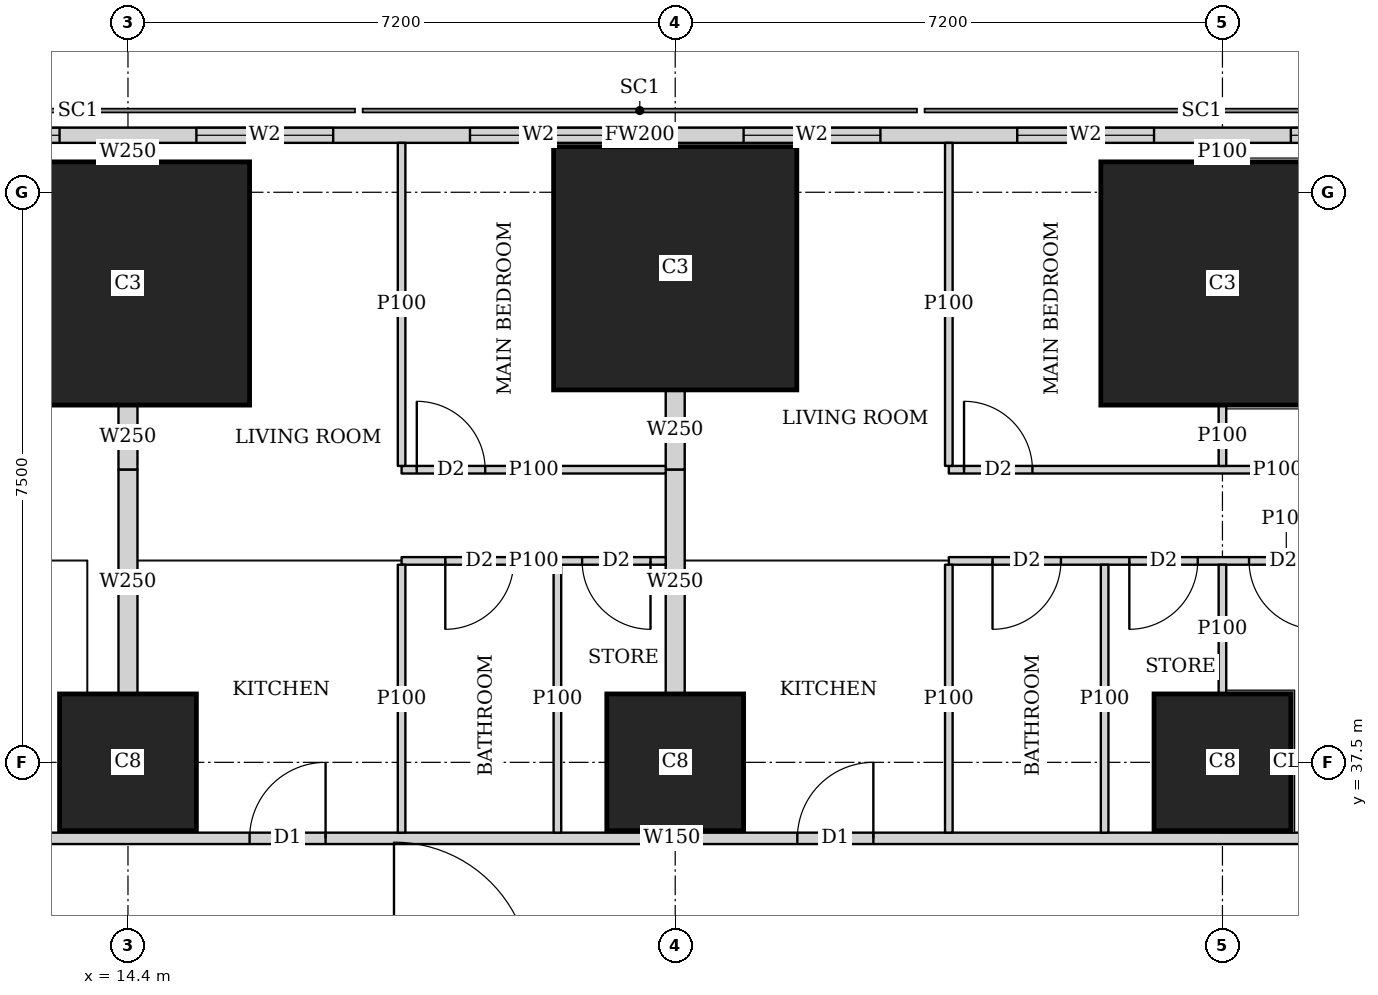
"""IFC4 building model, lengths in metres.
Left out: names, types, materials, properties, quantities, classifications, styles, units other than length and angle.
Written with IfcOpenShell. Run it as: python <this file> out.ifc"""

import sys

from ifc_helpers import new_model, si_unit, direction, frame, frame_2d, origin, origin_2d, place, context, subcontext, project, spatial, rectangle, extrude, element, fill, save


model = new_model("IFC4")
c1 = context("Model", 3, precision=1e-05, world=origin(), true_north=direction((0.0, 1.0)))
c2 = subcontext(c1, "Body", "Model", "MODEL_VIEW")
j1 = project(units=[si_unit("LENGTHUNIT", "METRE"), si_unit("PLANEANGLEUNIT", "RADIAN")], contexts=[c1])
p1 = place(None, origin())
s1 = spatial("IfcSite", under=j1, at=p1, CompositionType="ELEMENT")
p2 = place(p1, origin())
s2 = spatial("IfcBuilding", under=s1, at=p2, CompositionType="ELEMENT")
p3 = place(p2, frame((0.0, 0.0, 23.75)))
s3 = spatial("IfcBuildingStorey", under=s2, at=p3, CompositionType="ELEMENT", Elevation=23.75)
for number, where, z_axis, x_axis in (
    (1, (14.4, 37.5, 0.0), (0.0, 0.0, 1.0), (1.0, 0.0, 0.0)),
    (2, (21.6, 37.5, 0.0), (0.0, 0.0, 1.0), (1.0, 0.0, 0.0)),
    (3, (28.8, 37.5, 0.0), (0.0, 0.0, 1.0), (1.0, 0.0, 0.0)),
):
    element("IfcColumn", number, at=place(p3, frame(where, z_axis=z_axis, x_axis=x_axis)), inside=s3, PredefinedType="COLUMN", context=c2, shape_type="SweptSolid", body=[
        extrude(rectangle(XDim=1.8, YDim=1.8, at=origin_2d()), origin(), (0.0, 0.0, 1.0), 3.75),
    ])
for number, where, z_axis, x_axis in (
    (4, (14.4, 43.8, 0.0), (0.0, 0.0, 1.0), (1.0, 0.0, 0.0)),
    (5, (21.6, 44.0, 0.0), (0.0, 0.0, 1.0), (1.0, 0.0, 0.0)),
    (6, (28.8, 43.8, 0.0), (0.0, 0.0, 1.0), (1.0, 0.0, 0.0)),
):
    element("IfcColumn", number, at=place(p3, frame(where, z_axis=z_axis, x_axis=x_axis)), inside=s3, PredefinedType="COLUMN", context=c2, shape_type="SweptSolid", body=[
        extrude(rectangle(XDim=3.2, YDim=3.2, at=origin_2d()), origin(), (0.0, 0.0, 1.0), 3.75),
    ])
p4 = place(p3, frame((40.106, 45.75, 0.0), z_axis=(0.0, 0.0, 1.0), x_axis=(-1.0, 0.0, 0.0)))
e7 = element("IfcWall", 7, at=p4, inside=s3, PredefinedType="SOLIDWALL", context=c2, shape_type="SweptSolid", body=[
    extrude(rectangle(XDim=37.943, YDim=0.2, at=frame_2d((18.971, 0.0))), origin(), (0.0, 0.0, 1.0), 3.5),
])
p5 = place(p4, frame((8.606, 0.0, 0.9)))
e8 = element("IfcOpeningElement", 8, at=p5, cuts=e7, PredefinedType="OPENING", context=c2, shape_type="SweptSolid", body=[
    extrude(rectangle(XDim=1.8, YDim=1.5, at=frame_2d((0.9, 0.75))), frame((0.0, 0.11, 0.0), z_axis=(0.0, -1.0, 0.0), x_axis=(1.0, 0.0, 0.0)), (0.0, 0.0, 1.0), 0.22),
])
p6 = place(p4, frame((12.206, 0.0, 0.9)))
e9 = element("IfcOpeningElement", 9, at=p6, cuts=e7, PredefinedType="OPENING", context=c2, shape_type="SweptSolid", body=[
    extrude(rectangle(XDim=1.8, YDim=1.5, at=frame_2d((0.9, 0.75))), frame((0.0, 0.11, 0.0), z_axis=(0.0, -1.0, 0.0), x_axis=(1.0, 0.0, 0.0)), (0.0, 0.0, 1.0), 0.22),
])
p7 = place(p4, frame((15.806, 0.0, 0.9)))
e10 = element("IfcOpeningElement", 10, at=p7, cuts=e7, PredefinedType="OPENING", context=c2, shape_type="SweptSolid", body=[
    extrude(rectangle(XDim=1.8, YDim=1.5, at=frame_2d((0.9, 0.75))), frame((0.0, 0.11, 0.0), z_axis=(0.0, -1.0, 0.0), x_axis=(1.0, 0.0, 0.0)), (0.0, 0.0, 1.0), 0.22),
])
p8 = place(p4, frame((19.406, 0.0, 0.9)))
e11 = element("IfcOpeningElement", 11, at=p8, cuts=e7, PredefinedType="OPENING", context=c2, shape_type="SweptSolid", body=[
    extrude(rectangle(XDim=1.8, YDim=1.5, at=frame_2d((0.9, 0.75))), frame((0.0, 0.11, 0.0), z_axis=(0.0, -1.0, 0.0), x_axis=(1.0, 0.0, 0.0)), (0.0, 0.0, 1.0), 0.22),
])
p9 = place(p4, frame((23.006, 0.0, 0.9)))
e12 = element("IfcOpeningElement", 12, at=p9, cuts=e7, PredefinedType="OPENING", context=c2, shape_type="SweptSolid", body=[
    extrude(rectangle(XDim=1.8, YDim=1.5, at=frame_2d((0.9, 0.75))), frame((0.0, 0.11, 0.0), z_axis=(0.0, -1.0, 0.0), x_axis=(1.0, 0.0, 0.0)), (0.0, 0.0, 1.0), 0.22),
])
p10 = place(p4, frame((26.606, 0.0, 0.9)))
e13 = element("IfcOpeningElement", 13, at=p10, cuts=e7, PredefinedType="OPENING", context=c2, shape_type="SweptSolid", body=[
    extrude(rectangle(XDim=1.8, YDim=1.5, at=frame_2d((0.9, 0.75))), frame((0.0, 0.11, 0.0), z_axis=(0.0, -1.0, 0.0), x_axis=(1.0, 0.0, 0.0)), (0.0, 0.0, 1.0), 0.22),
])
p11 = place(p3, frame((8.35, 36.5, 0.0), z_axis=(0.0, 0.0, 1.0), x_axis=(1.0, 0.0, 0.0)))
e14 = element("IfcWall", 14, at=p11, inside=s3, PredefinedType="SOLIDWALL", context=c2, shape_type="SweptSolid", body=[
    extrude(rectangle(XDim=26.415, YDim=0.15, at=frame_2d((13.208, 0.0))), origin(), (0.0, 0.0, 1.0), 3.5),
])
p12 = place(p11, frame((3.383, 0.0, 0.0)))
e15 = element("IfcOpeningElement", 15, at=p12, cuts=e14, PredefinedType="OPENING", context=c2, shape_type="SweptSolid", body=[
    extrude(rectangle(XDim=1.0, YDim=2.1, at=frame_2d((0.5, 1.05))), frame((0.0, 0.085, 0.0), z_axis=(0.0, -1.0, 0.0), x_axis=(1.0, 0.0, 0.0)), (0.0, 0.0, 1.0), 0.17),
])
p13 = place(p11, frame((7.65, 0.0, 0.0)))
e16 = element("IfcOpeningElement", 16, at=p13, cuts=e14, PredefinedType="OPENING", context=c2, shape_type="SweptSolid", body=[
    extrude(rectangle(XDim=1.0, YDim=2.1, at=frame_2d((0.5, 1.05))), frame((0.0, 0.085, 0.0), z_axis=(0.0, -1.0, 0.0), x_axis=(1.0, 0.0, 0.0)), (0.0, 0.0, 1.0), 0.17),
])
p14 = place(p11, frame((14.857, 0.0, 0.0)))
e17 = element("IfcOpeningElement", 17, at=p14, cuts=e14, PredefinedType="OPENING", context=c2, shape_type="SweptSolid", body=[
    extrude(rectangle(XDim=1.0, YDim=2.1, at=frame_2d((0.5, 1.05))), frame((0.0, 0.085, 0.0), z_axis=(0.0, -1.0, 0.0), x_axis=(1.0, 0.0, 0.0)), (0.0, 0.0, 1.0), 0.17),
])
p15 = place(p3, frame((18.0, 41.35, 0.0), z_axis=(0.0, 0.0, 1.0), x_axis=(1.0, 0.0, 0.0)))
e18 = element("IfcWall", 18, at=p15, inside=s3, PredefinedType="PARTITIONING", context=c2, shape_type="SweptSolid", body=[
    extrude(rectangle(XDim=3.475, YDim=0.1, at=frame_2d((1.738, 0.0))), origin(), (0.0, 0.0, 1.0), 3.5),
])
p16 = place(p15, frame((0.2, 0.0, 0.0)))
e19 = element("IfcOpeningElement", 19, at=p16, cuts=e18, PredefinedType="OPENING", context=c2, shape_type="SweptSolid", body=[
    extrude(rectangle(XDim=0.9, YDim=2.1, at=frame_2d((0.45, 1.05))), frame((0.0, 0.06, 0.0), z_axis=(0.0, -1.0, 0.0), x_axis=(1.0, 0.0, 0.0)), (0.0, 0.0, 1.0), 0.12),
])
p17 = place(p3, frame((18.0, 40.15, 0.0), z_axis=(0.0, 0.0, 1.0), x_axis=(1.0, 0.0, 0.0)))
e20 = element("IfcWall", 20, at=p17, inside=s3, PredefinedType="PARTITIONING", context=c2, shape_type="SweptSolid", body=[
    extrude(rectangle(XDim=3.475, YDim=0.1, at=frame_2d((1.738, 0.0))), origin(), (0.0, 0.0, 1.0), 3.5),
])
p18 = place(p17, frame((0.575, 0.0, 0.0)))
e21 = element("IfcOpeningElement", 21, at=p18, cuts=e20, PredefinedType="OPENING", context=c2, shape_type="SweptSolid", body=[
    extrude(rectangle(XDim=0.9, YDim=2.1, at=frame_2d((0.45, 1.05))), frame((0.0, 0.06, 0.0), z_axis=(0.0, -1.0, 0.0), x_axis=(1.0, 0.0, 0.0)), (0.0, 0.0, 1.0), 0.12),
])
p19 = place(p17, frame((2.375, 0.0, 0.0)))
e22 = element("IfcOpeningElement", 22, at=p19, cuts=e20, PredefinedType="OPENING", context=c2, shape_type="SweptSolid", body=[
    extrude(rectangle(XDim=0.9, YDim=2.1, at=frame_2d((0.45, 1.05))), frame((0.0, 0.06, 0.0), z_axis=(0.0, -1.0, 0.0), x_axis=(1.0, 0.0, 0.0)), (0.0, 0.0, 1.0), 0.12),
])
p20 = place(p3, frame((18.0, 41.4, 0.0), z_axis=(0.0, 0.0, 1.0), x_axis=(0.0, 1.0, 0.0)))
e23 = element("IfcWall", 23, at=p20, inside=s3, PredefinedType="PARTITIONING", context=c2, shape_type="SweptSolid", body=[
    extrude(rectangle(XDim=4.25, YDim=0.1, at=frame_2d((2.125, 0.0))), origin(), (0.0, 0.0, 1.0), 2.05),
])
for number, where, z_axis, x_axis in (
    (24, (18.0, 36.575, 0.0), (0.0, 0.0, 1.0), (0.0, 1.0, 0.0)),
    (25, (20.05, 36.575, 0.0), (0.0, 0.0, 1.0), (0.0, 1.0, 0.0)),
):
    element("IfcWall", number, at=place(p3, frame(where, z_axis=z_axis, x_axis=x_axis)), inside=s3, PredefinedType="PARTITIONING", context=c2, shape_type="SweptSolid", body=[
        extrude(rectangle(XDim=3.525, YDim=0.1, at=frame_2d((1.763, 0.0))), origin(), (0.0, 0.0, 1.0), 3.5),
    ])
p21 = place(p3, frame((14.4, 41.35, 0.0), z_axis=(0.0, 0.0, 1.0), x_axis=(0.0, 1.0, 0.0)))
e26 = element("IfcWall", 26, at=p21, inside=s3, PredefinedType="SOLIDWALL", context=c2, shape_type="SweptSolid", body=[
    extrude(rectangle(XDim=0.849, YDim=0.25, at=frame_2d((0.424, 0.0))), origin(), (0.0, 0.0, 1.0), 2.05),
])
p22 = place(p3, frame((14.4, 45.401, 0.0), z_axis=(0.0, 0.0, 1.0), x_axis=(0.0, 1.0, 0.0)))
e27 = element("IfcWall", 27, at=p22, inside=s3, PredefinedType="SOLIDWALL", context=c2, shape_type="SweptSolid", body=[
    extrude(rectangle(XDim=0.249, YDim=0.25, at=frame_2d((0.125, 0.0))), origin(), (0.0, 0.0, 1.0), 2.05),
])
p23 = place(p3, frame((14.4, 38.401, 0.0), z_axis=(0.0, 0.0, 1.0), x_axis=(0.0, 1.0, 0.0)))
e28 = element("IfcWall", 28, at=p23, inside=s3, PredefinedType="SOLIDWALL", context=c2, shape_type="SweptSolid", body=[
    extrude(rectangle(XDim=2.949, YDim=0.25, at=frame_2d((1.475, 0.0))), origin(), (0.0, 0.0, 1.0), 3.5),
])
p24 = place(p3, frame((25.2, 41.35, 0.0), z_axis=(0.0, 0.0, 1.0), x_axis=(1.0, 0.0, 0.0)))
e29 = element("IfcWall", 29, at=p24, inside=s3, PredefinedType="PARTITIONING", context=c2, shape_type="SweptSolid", body=[
    extrude(rectangle(XDim=8.653, YDim=0.1, at=frame_2d((4.327, 0.0))), origin(), (0.0, 0.0, 1.0), 3.5),
])
p25 = place(p24, frame((0.2, 0.0, 0.0)))
e30 = element("IfcOpeningElement", 30, at=p25, cuts=e29, PredefinedType="OPENING", context=c2, shape_type="SweptSolid", body=[
    extrude(rectangle(XDim=0.9, YDim=2.1, at=frame_2d((0.45, 1.05))), frame((0.0, 0.06, 0.0), z_axis=(0.0, -1.0, 0.0), x_axis=(1.0, 0.0, 0.0)), (0.0, 0.0, 1.0), 0.12),
])
p26 = place(p24, frame((5.25, 0.0, 0.0)))
e31 = element("IfcOpeningElement", 31, at=p26, cuts=e29, PredefinedType="OPENING", context=c2, shape_type="SweptSolid", body=[
    extrude(rectangle(XDim=0.9, YDim=2.1, at=frame_2d((0.45, 1.05))), frame((0.0, 0.06, 0.0), z_axis=(0.0, -1.0, 0.0), x_axis=(1.0, 0.0, 0.0)), (0.0, 0.0, 1.0), 0.12),
])
p27 = place(p3, frame((25.2, 40.15, 0.0), z_axis=(0.0, 0.0, 1.0), x_axis=(1.0, 0.0, 0.0)))
e32 = element("IfcWall", 32, at=p27, inside=s3, PredefinedType="PARTITIONING", context=c2, shape_type="SweptSolid", body=[
    extrude(rectangle(XDim=8.88, YDim=0.1, at=frame_2d((4.44, 0.0))), origin(), (0.0, 0.0, 1.0), 3.5),
])
p28 = place(p27, frame((0.575, 0.0, 0.0)))
e33 = element("IfcOpeningElement", 33, at=p28, cuts=e32, PredefinedType="OPENING", context=c2, shape_type="SweptSolid", body=[
    extrude(rectangle(XDim=0.9, YDim=2.1, at=frame_2d((0.45, 1.05))), frame((0.0, 0.06, 0.0), z_axis=(0.0, -1.0, 0.0), x_axis=(1.0, 0.0, 0.0)), (0.0, 0.0, 1.0), 0.12),
])
p29 = place(p27, frame((3.95, 0.0, 0.0)))
e34 = element("IfcOpeningElement", 34, at=p29, cuts=e32, PredefinedType="OPENING", context=c2, shape_type="SweptSolid", body=[
    extrude(rectangle(XDim=0.9, YDim=2.1, at=frame_2d((0.45, 1.05))), frame((0.0, 0.06, 0.0), z_axis=(0.0, -1.0, 0.0), x_axis=(1.0, 0.0, 0.0)), (0.0, 0.0, 1.0), 0.12),
])
p30 = place(p27, frame((7.83, 0.0, 0.0)))
e35 = element("IfcOpeningElement", 35, at=p30, cuts=e32, PredefinedType="OPENING", context=c2, shape_type="SweptSolid", body=[
    extrude(rectangle(XDim=0.9, YDim=2.1, at=frame_2d((0.45, 1.05))), frame((0.0, 0.06, 0.0), z_axis=(0.0, -1.0, 0.0), x_axis=(1.0, 0.0, 0.0)), (0.0, 0.0, 1.0), 0.12),
])
p31 = place(p27, frame((2.375, 0.0, 0.0)))
e36 = element("IfcOpeningElement", 36, at=p31, cuts=e32, PredefinedType="OPENING", context=c2, shape_type="SweptSolid", body=[
    extrude(rectangle(XDim=0.9, YDim=2.1, at=frame_2d((0.45, 1.05))), frame((0.0, 0.06, 0.0), z_axis=(0.0, -1.0, 0.0), x_axis=(1.0, 0.0, 0.0)), (0.0, 0.0, 1.0), 0.12),
])
p32 = place(p27, frame((5.75, 0.0, 0.0)))
e37 = element("IfcOpeningElement", 37, at=p32, cuts=e32, PredefinedType="OPENING", context=c2, shape_type="SweptSolid", body=[
    extrude(rectangle(XDim=0.9, YDim=2.1, at=frame_2d((0.45, 1.05))), frame((0.0, 0.06, 0.0), z_axis=(0.0, -1.0, 0.0), x_axis=(1.0, 0.0, 0.0)), (0.0, 0.0, 1.0), 0.12),
])
p33 = place(p3, frame((25.2, 41.4, 0.0), z_axis=(0.0, 0.0, 1.0), x_axis=(0.0, 1.0, 0.0)))
e38 = element("IfcWall", 38, at=p33, inside=s3, PredefinedType="PARTITIONING", context=c2, shape_type="SweptSolid", body=[
    extrude(rectangle(XDim=4.25, YDim=0.1, at=frame_2d((2.125, 0.0))), origin(), (0.0, 0.0, 1.0), 2.05),
])
p34 = place(p3, frame((28.8, 41.4, 0.0), z_axis=(0.0, 0.0, 1.0), x_axis=(0.0, 1.0, 0.0)))
e39 = element("IfcWall", 39, at=p34, inside=s3, PredefinedType="PARTITIONING", context=c2, shape_type="SweptSolid", body=[
    extrude(rectangle(XDim=0.799, YDim=0.1, at=frame_2d((0.399, 0.0))), origin(), (0.0, 0.0, 1.0), 3.5),
])
p35 = place(p3, frame((28.8, 45.401, 0.0), z_axis=(0.0, 0.0, 1.0), x_axis=(0.0, 1.0, 0.0)))
e40 = element("IfcWall", 40, at=p35, inside=s3, PredefinedType="PARTITIONING", context=c2, shape_type="SweptSolid", body=[
    extrude(rectangle(XDim=0.249, YDim=0.1, at=frame_2d((0.125, 0.0))), origin(), (0.0, 0.0, 1.0), 3.5),
])
p36 = place(p3, frame((25.2, 36.575, 0.0), z_axis=(0.0, 0.0, 1.0), x_axis=(0.0, 1.0, 0.0)))
e41 = element("IfcWall", 41, at=p36, inside=s3, PredefinedType="PARTITIONING", context=c2, shape_type="SweptSolid", body=[
    extrude(rectangle(XDim=3.525, YDim=0.1, at=frame_2d((1.763, 0.0))), origin(), (0.0, 0.0, 1.0), 3.5),
])
p37 = place(p3, frame((28.8, 38.401, 0.0), z_axis=(0.0, 0.0, 1.0), x_axis=(0.0, 1.0, 0.0)))
e42 = element("IfcWall", 42, at=p37, inside=s3, PredefinedType="PARTITIONING", context=c2, shape_type="SweptSolid", body=[
    extrude(rectangle(XDim=1.699, YDim=0.1, at=frame_2d((0.85, 0.0))), origin(), (0.0, 0.0, 1.0), 3.5),
])
p38 = place(p3, frame((27.25, 36.575, 0.0), z_axis=(0.0, 0.0, 1.0), x_axis=(0.0, 1.0, 0.0)))
e43 = element("IfcWall", 43, at=p38, inside=s3, PredefinedType="PARTITIONING", context=c2, shape_type="SweptSolid", body=[
    extrude(rectangle(XDim=3.525, YDim=0.1, at=frame_2d((1.763, 0.0))), origin(), (0.0, 0.0, 1.0), 3.5),
])
p39 = place(p3, frame((21.6, 41.35, 0.0), z_axis=(0.0, 0.0, 1.0), x_axis=(0.0, 1.0, 0.0)))
e44 = element("IfcWall", 44, at=p39, inside=s3, PredefinedType="SOLIDWALL", context=c2, shape_type="SweptSolid", body=[
    extrude(rectangle(XDim=1.049, YDim=0.25, at=frame_2d((0.524, 0.0))), origin(), (0.0, 0.0, 1.0), 2.05),
])
p40 = place(p3, frame((21.6, 38.401, 0.0), z_axis=(0.0, 0.0, 1.0), x_axis=(0.0, 1.0, 0.0)))
e45 = element("IfcWall", 45, at=p40, inside=s3, PredefinedType="SOLIDWALL", context=c2, shape_type="SweptSolid", body=[
    extrude(rectangle(XDim=2.949, YDim=0.25, at=frame_2d((1.475, 0.0))), origin(), (0.0, 0.0, 1.0), 3.5),
])
p41 = place(p5, origin())
e46 = element("IfcWindow", 46, at=p41, inside=s3, PartitioningType="SINGLE_PANEL", PredefinedType="WINDOW", context=c2, shape_type="SweptSolid", body=[
    extrude(rectangle(XDim=1.8, YDim=1.5, at=frame_2d((0.9, 0.75))), frame((0.0, 0.03, 0.0), z_axis=(0.0, -1.0, 0.0), x_axis=(1.0, 0.0, 0.0)), (0.0, 0.0, 1.0), 0.06),
])
fill(e8, e46)
p42 = place(p6, origin())
e47 = element("IfcWindow", 47, at=p42, inside=s3, PartitioningType="SINGLE_PANEL", PredefinedType="WINDOW", context=c2, shape_type="SweptSolid", body=[
    extrude(rectangle(XDim=1.8, YDim=1.5, at=frame_2d((0.9, 0.75))), frame((0.0, 0.03, 0.0), z_axis=(0.0, -1.0, 0.0), x_axis=(1.0, 0.0, 0.0)), (0.0, 0.0, 1.0), 0.06),
])
fill(e9, e47)
p43 = place(p7, origin())
e48 = element("IfcWindow", 48, at=p43, inside=s3, PartitioningType="SINGLE_PANEL", PredefinedType="WINDOW", context=c2, shape_type="SweptSolid", body=[
    extrude(rectangle(XDim=1.8, YDim=1.5, at=frame_2d((0.9, 0.75))), frame((0.0, 0.03, 0.0), z_axis=(0.0, -1.0, 0.0), x_axis=(1.0, 0.0, 0.0)), (0.0, 0.0, 1.0), 0.06),
])
fill(e10, e48)
p44 = place(p8, origin())
e49 = element("IfcWindow", 49, at=p44, inside=s3, PartitioningType="SINGLE_PANEL", PredefinedType="WINDOW", context=c2, shape_type="SweptSolid", body=[
    extrude(rectangle(XDim=1.8, YDim=1.5, at=frame_2d((0.9, 0.75))), frame((0.0, 0.03, 0.0), z_axis=(0.0, -1.0, 0.0), x_axis=(1.0, 0.0, 0.0)), (0.0, 0.0, 1.0), 0.06),
])
fill(e11, e49)
p45 = place(p9, origin())
e50 = element("IfcWindow", 50, at=p45, inside=s3, PartitioningType="SINGLE_PANEL", PredefinedType="WINDOW", context=c2, shape_type="SweptSolid", body=[
    extrude(rectangle(XDim=1.8, YDim=1.5, at=frame_2d((0.9, 0.75))), frame((0.0, 0.03, 0.0), z_axis=(0.0, -1.0, 0.0), x_axis=(1.0, 0.0, 0.0)), (0.0, 0.0, 1.0), 0.06),
])
fill(e12, e50)
p46 = place(p10, origin())
e51 = element("IfcWindow", 51, at=p46, inside=s3, PartitioningType="SINGLE_PANEL", PredefinedType="WINDOW", context=c2, shape_type="SweptSolid", body=[
    extrude(rectangle(XDim=1.8, YDim=1.5, at=frame_2d((0.9, 0.75))), frame((0.0, 0.03, 0.0), z_axis=(0.0, -1.0, 0.0), x_axis=(1.0, 0.0, 0.0)), (0.0, 0.0, 1.0), 0.06),
])
fill(e13, e51)
p47 = place(p16, origin())
e52 = element("IfcDoor", 52, at=p47, inside=s3, OperationType="SINGLE_SWING_LEFT", PredefinedType="DOOR", context=c2, shape_type="SweptSolid", body=[
    extrude(rectangle(XDim=0.9, YDim=2.1, at=frame_2d((0.45, 1.05))), frame((0.0, 0.025, 0.0), z_axis=(0.0, -1.0, 0.0), x_axis=(1.0, 0.0, 0.0)), (0.0, 0.0, 1.0), 0.05),
])
fill(e19, e52)
p48 = place(p18, origin())
e53 = element("IfcDoor", 53, at=p48, inside=s3, OperationType="SINGLE_SWING_RIGHT", PredefinedType="DOOR", context=c2, shape_type="SweptSolid", body=[
    extrude(rectangle(XDim=0.9, YDim=2.1, at=frame_2d((0.45, 1.05))), frame((0.0, 0.025, 0.0), z_axis=(0.0, -1.0, 0.0), x_axis=(1.0, 0.0, 0.0)), (0.0, 0.0, 1.0), 0.05),
])
fill(e21, e53)
p49 = place(p19, origin())
e54 = element("IfcDoor", 54, at=p49, inside=s3, OperationType="SINGLE_SWING_LEFT", PredefinedType="DOOR", context=c2, shape_type="SweptSolid", body=[
    extrude(rectangle(XDim=0.9, YDim=2.1, at=frame_2d((0.45, 1.05))), frame((0.0, 0.025, 0.0), z_axis=(0.0, -1.0, 0.0), x_axis=(1.0, 0.0, 0.0)), (0.0, 0.0, 1.0), 0.05),
])
fill(e22, e54)
p50 = place(p13, origin())
e55 = element("IfcDoor", 55, at=p50, inside=s3, OperationType="SINGLE_SWING_RIGHT", PredefinedType="DOOR", context=c2, shape_type="SweptSolid", body=[
    extrude(rectangle(XDim=1.0, YDim=2.1, at=frame_2d((0.5, 1.05))), frame((0.0, 0.025, 0.0), z_axis=(0.0, -1.0, 0.0), x_axis=(1.0, 0.0, 0.0)), (0.0, 0.0, 1.0), 0.05),
])
fill(e16, e55)
p51 = place(p25, origin())
e56 = element("IfcDoor", 56, at=p51, inside=s3, OperationType="SINGLE_SWING_LEFT", PredefinedType="DOOR", context=c2, shape_type="SweptSolid", body=[
    extrude(rectangle(XDim=0.9, YDim=2.1, at=frame_2d((0.45, 1.05))), frame((0.0, 0.025, 0.0), z_axis=(0.0, -1.0, 0.0), x_axis=(1.0, 0.0, 0.0)), (0.0, 0.0, 1.0), 0.05),
])
fill(e30, e56)
p52 = place(p28, origin())
e57 = element("IfcDoor", 57, at=p52, inside=s3, OperationType="SINGLE_SWING_RIGHT", PredefinedType="DOOR", context=c2, shape_type="SweptSolid", body=[
    extrude(rectangle(XDim=0.9, YDim=2.1, at=frame_2d((0.45, 1.05))), frame((0.0, 0.025, 0.0), z_axis=(0.0, -1.0, 0.0), x_axis=(1.0, 0.0, 0.0)), (0.0, 0.0, 1.0), 0.05),
])
fill(e33, e57)
p53 = place(p29, origin())
e58 = element("IfcDoor", 58, at=p53, inside=s3, OperationType="SINGLE_SWING_LEFT", PredefinedType="DOOR", context=c2, shape_type="SweptSolid", body=[
    extrude(rectangle(XDim=0.9, YDim=2.1, at=frame_2d((0.45, 1.05))), frame((0.0, 0.025, 0.0), z_axis=(0.0, -1.0, 0.0), x_axis=(1.0, 0.0, 0.0)), (0.0, 0.0, 1.0), 0.05),
])
fill(e34, e58)
p54 = place(p31, origin())
e59 = element("IfcDoor", 59, at=p54, inside=s3, OperationType="SINGLE_SWING_RIGHT", PredefinedType="DOOR", context=c2, shape_type="SweptSolid", body=[
    extrude(rectangle(XDim=0.9, YDim=2.1, at=frame_2d((0.45, 1.05))), frame((0.0, 0.025, 0.0), z_axis=(0.0, -1.0, 0.0), x_axis=(1.0, 0.0, 0.0)), (0.0, 0.0, 1.0), 0.05),
])
fill(e36, e59)
p55 = place(p14, origin())
e60 = element("IfcDoor", 60, at=p55, inside=s3, OperationType="SINGLE_SWING_RIGHT", PredefinedType="DOOR", context=c2, shape_type="SweptSolid", body=[
    extrude(rectangle(XDim=1.0, YDim=2.1, at=frame_2d((0.5, 1.05))), frame((0.0, 0.025, 0.0), z_axis=(0.0, -1.0, 0.0), x_axis=(1.0, 0.0, 0.0)), (0.0, 0.0, 1.0), 0.05),
])
fill(e17, e60)
save(model, sys.argv[1])
